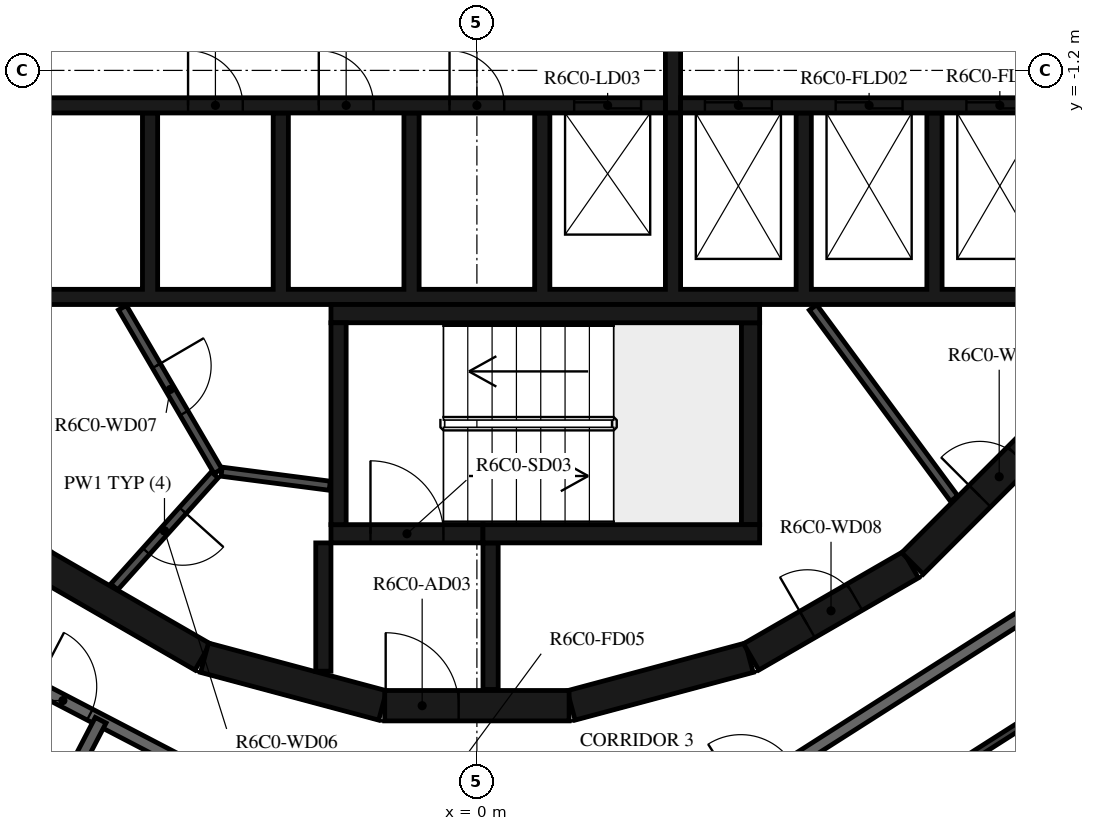
"""IFC4 building model, lengths in metres.
Left out: names, types, materials, properties, quantities, classifications, styles, units other than length and angle.
Written with IfcOpenShell. Run it as: python <this file> out.ifc"""

import sys

from ifc_helpers import new_model, si_unit, direction, frame, frame_2d, origin, place, context, subcontext, project, spatial, polyline, rectangle, outline, extrude, element, fill, save


model = new_model("IFC4")
c1 = context("Model", 3, precision=1e-05, world=origin(), true_north=direction((0.0, 1.0)))
c2 = subcontext(c1, "Body", "Model", "MODEL_VIEW")
j1 = project(units=[si_unit("LENGTHUNIT", "METRE"), si_unit("PLANEANGLEUNIT", "RADIAN")], contexts=[c1])
p1 = place(None, origin())
s1 = spatial("IfcSite", under=j1, at=p1, CompositionType="ELEMENT")
p2 = place(p1, origin())
s2 = spatial("IfcBuilding", under=s1, at=p2, CompositionType="ELEMENT")
p3 = place(p2, frame((0.0, 0.0, 254.7)))
s3 = spatial("IfcBuildingStorey", under=s2, at=p3, CompositionType="ELEMENT", Elevation=254.7)
p4 = place(p3, frame((1.55, -11.643, 0.0), z_axis=(0.0, 0.0, 1.0), x_axis=(0.965948410781, 0.258734743916, 0.0)))
e1 = element("IfcWall", 1, at=p4, inside=s3, PredefinedType="SHEAR", context=c2, shape_type="SweptSolid", body=[
    extrude(rectangle(XDim=3.033, YDim=0.5, at=frame_2d((1.516, 0.0))), origin(), (0.0, 0.0, 1.0), 3.05),
])
p5 = place(p3, frame((4.51, -10.845, 0.0), z_axis=(0.0, 0.0, 1.0), x_axis=(0.865975092491, 0.500087131594, 0.0)))
e2 = element("IfcWall", 2, at=p5, inside=s3, PredefinedType="SHEAR", context=c2, shape_type="SweptSolid", body=[
    extrude(rectangle(XDim=3.033, YDim=0.5, at=frame_2d((1.516, 0.0))), origin(), (0.0, 0.0, 1.0), 3.05),
])
p6 = place(p5, frame((1.066, 0.0, 0.0)))
e3 = element("IfcOpeningElement", 3, at=p6, cuts=e2, PredefinedType="OPENING", context=c2, shape_type="SweptSolid", body=[
    extrude(rectangle(XDim=0.9, YDim=2.1, at=frame_2d((0.45, 1.05))), frame((0.0, 0.26, 0.0), z_axis=(0.0, -1.0, 0.0), x_axis=(1.0, 0.0, 0.0)), (0.0, 0.0, 1.0), 0.52),
])
p7 = place(p3, frame((7.164, -9.308, 0.0), z_axis=(0.0, 0.0, 1.0), x_axis=(0.707106781187, 0.707106781187, 0.0)))
e4 = element("IfcWall", 4, at=p7, inside=s3, PredefinedType="SHEAR", context=c2, shape_type="SweptSolid", body=[
    extrude(rectangle(XDim=3.032, YDim=0.5, at=frame_2d((1.516, 0.0))), origin(), (0.0, 0.0, 1.0), 3.05),
])
p8 = place(p7, frame((1.566, 0.0, 0.0)))
e5 = element("IfcOpeningElement", 5, at=p8, cuts=e4, PredefinedType="OPENING", context=c2, shape_type="SweptSolid", body=[
    extrude(rectangle(XDim=0.9, YDim=2.1, at=frame_2d((0.45, 1.05))), frame((0.0, 0.26, 0.0), z_axis=(0.0, -1.0, 0.0), x_axis=(1.0, 0.0, 0.0)), (0.0, 0.0, 1.0), 0.52),
])
for number, where, z_axis, x_axis in (
    (6, (-7.137, -9.329, 0.0), (0.0, 0.0, 1.0), (0.866, -0.5, 0.0)),
    (7, (-4.479, -10.858, 0.0), (0.0, 0.0, 1.0), (0.966, -0.259, 0.0)),
):
    element("IfcWall", number, at=place(p3, frame(where, z_axis=z_axis, x_axis=x_axis)), inside=s3, PredefinedType="SHEAR", context=c2, shape_type="SweptSolid", body=[
        extrude(rectangle(XDim=3.033, YDim=0.5, at=frame_2d((1.516, 0.0))), origin(), (0.0, 0.0, 1.0), 3.05),
    ])
p9 = place(p3, frame((-1.516, -11.647, 0.0), z_axis=(0.0, 0.0, 1.0), x_axis=(1.0, 0.0, 0.0)))
e8 = element("IfcWall", 8, at=p9, inside=s3, PredefinedType="SHEAR", context=c2, shape_type="SweptSolid", body=[
    extrude(rectangle(XDim=3.033, YDim=0.5, at=frame_2d((1.516, 0.0))), origin(), (0.0, 0.0, 1.0), 3.05),
])
p10 = place(p9, frame((0.016, 0.0, 0.0)))
e9 = element("IfcOpeningElement", 9, at=p10, cuts=e8, PredefinedType="OPENING", context=c2, shape_type="SweptSolid", body=[
    extrude(rectangle(XDim=1.2, YDim=2.1, at=frame_2d((0.6, 1.05))), frame((0.0, 0.26, 0.0), z_axis=(0.0, -1.0, 0.0), x_axis=(1.0, 0.0, 0.0)), (0.0, 0.0, 1.0), 0.52),
])
p11 = place(p3, frame((-2.275, -8.67, 0.0), z_axis=(0.0, 0.0, 1.0), x_axis=(0.0, 1.0, 0.0)))
e10 = element("IfcWall", 10, at=p11, inside=s3, PredefinedType="SHEAR", context=c2, shape_type="SweptSolid", body=[
    extrude(rectangle(XDim=3.32, YDim=0.25, at=frame_2d((1.66, 0.0))), origin(), (0.0, 0.0, 1.0), 3.05),
])
p12 = place(p3, frame((-2.4, -5.2, 0.0), z_axis=(0.0, 0.0, 1.0), x_axis=(1.0, 0.0, 0.0)))
e11 = element("IfcWall", 11, at=p12, inside=s3, PredefinedType="SHEAR", context=c2, shape_type="SweptSolid", body=[
    extrude(rectangle(XDim=7.05, YDim=0.3, at=frame_2d((3.525, 0.0))), origin(), (0.0, 0.0, 1.0), 3.05),
])
p13 = place(p3, frame((4.5, -8.67, 0.0), z_axis=(0.0, 0.0, 1.0), x_axis=(0.0, 1.0, 0.0)))
e12 = element("IfcWall", 12, at=p13, inside=s3, PredefinedType="SHEAR", context=c2, shape_type="SweptSolid", body=[
    extrude(rectangle(XDim=3.32, YDim=0.3, at=frame_2d((1.66, 0.0))), origin(), (0.0, 0.0, 1.0), 3.05),
])
p14 = place(p3, frame((0.1, -8.82, 0.0), z_axis=(0.0, 0.0, 1.0), x_axis=(1.0, 0.0, 0.0)))
e13 = element("IfcWall", 13, at=p14, inside=s3, PredefinedType="SHEAR", context=c2, shape_type="SweptSolid", body=[
    extrude(rectangle(XDim=4.55, YDim=0.3, at=frame_2d((2.275, 0.0))), origin(), (0.0, 0.0, 1.0), 3.05),
])
p15 = place(p3, frame((-2.4, -8.82, 0.0), z_axis=(0.0, 0.0, 1.0), x_axis=(1.0, 0.0, 0.0)))
e14 = element("IfcWall", 14, at=p15, inside=s3, PredefinedType="SHEAR", context=c2, shape_type="SweptSolid", body=[
    extrude(rectangle(XDim=2.5, YDim=0.3, at=frame_2d((1.25, 0.0))), origin(), (0.0, 0.0, 1.0), 3.05),
])
p16 = place(p15, frame((0.65, 0.0, 0.0)))
e15 = element("IfcOpeningElement", 15, at=p16, cuts=e14, PredefinedType="OPENING", context=c2, shape_type="SweptSolid", body=[
    extrude(rectangle(XDim=1.2, YDim=2.1, at=frame_2d((0.6, 1.05))), frame((0.0, 0.16, 0.0), z_axis=(0.0, -1.0, 0.0), x_axis=(1.0, 0.0, 0.0)), (0.0, 0.0, 1.0), 0.32),
])
p17 = place(p3, frame((-2.525, -8.97, 0.0), z_axis=(0.0, 0.0, 1.0), x_axis=(0.0, -1.0, 0.0)))
e16 = element("IfcWall", 16, at=p17, inside=s3, PredefinedType="SHEAR", context=c2, shape_type="SweptSolid", body=[
    extrude(rectangle(XDim=2.11, YDim=0.25, at=frame_2d((1.055, 0.0))), origin(), (0.0, 0.0, 1.0), 3.05),
])
p18 = place(p3, frame((0.225, -8.97, 0.0), z_axis=(0.0, 0.0, 1.0), x_axis=(0.0, -1.0, 0.0)))
e17 = element("IfcWall", 17, at=p18, inside=s3, PredefinedType="SHEAR", context=c2, shape_type="SweptSolid", body=[
    extrude(rectangle(XDim=2.41, YDim=0.25, at=frame_2d((1.205, 0.0))), origin(), (0.0, 0.0, 1.0), 3.05),
])
p19 = place(p3, origin())
e18 = element("IfcWall", 18, at=p19, inside=s3, PredefinedType="SHEAR", context=c2, shape_type="SweptSolid", body=[
    extrude(outline(polyline([(9.8, -5.05), (9.8, -4.8), (9.8, -1.9), (9.55, -1.9), (9.55, -4.8), (7.65, -4.8), (7.65, -1.9), (7.4, -1.9), (7.4, -4.8), (5.5, -4.8), (5.5, -1.9), (5.25, -1.9), (5.25, -4.8), (3.35, -4.8), (3.35, -1.9), (3.1, -1.9), (3.1, -4.8), (1.2, -4.8), (1.2, -1.9), (0.95, -1.9), (0.95, -4.8), (-0.95, -4.8), (-0.95, -1.9), (-1.2, -1.9), (-1.2, -4.8), (-3.1, -4.8), (-3.1, -1.9), (-3.35, -1.9), (-3.35, -4.8), (-5.25, -4.8), (-5.25, -1.9), (-5.5, -1.9), (-5.5, -4.8), (-7.4, -4.8), (-7.4, -1.9), (-7.65, -1.9), (-7.65, -4.8), (-9.55, -4.8), (-9.55, -1.9), (-9.8, -1.9), (-9.8, -4.8), (-9.8, -5.05), (9.8, -5.05)])), origin(), (0.0, 0.0, 1.0), 3.05),
])
p20 = place(p3, frame((-11.28, -1.775, 0.0), z_axis=(0.0, 0.0, 1.0), x_axis=(1.0, 0.0, 0.0)))
e19 = element("IfcWall", 19, at=p20, inside=s3, PredefinedType="SHEAR", context=c2, shape_type="SweptSolid", body=[
    extrude(rectangle(XDim=14.38, YDim=0.25, at=frame_2d((7.19, 0.0))), origin(), (0.0, 0.0, 1.0), 3.05),
])
p21 = place(p20, frame((12.88, 0.0, 0.0)))
e20 = element("IfcOpeningElement", 20, at=p21, cuts=e19, PredefinedType="OPENING", context=c2, shape_type="SweptSolid", body=[
    extrude(rectangle(XDim=1.1, YDim=2.1, at=frame_2d((0.55, 1.05))), frame((0.0, 0.135, 0.0), z_axis=(0.0, -1.0, 0.0), x_axis=(1.0, 0.0, 0.0)), (0.0, 0.0, 1.0), 0.27),
])
p22 = place(p20, frame((6.53, 0.0, 0.0)))
e21 = element("IfcOpeningElement", 21, at=p22, cuts=e19, PredefinedType="OPENING", context=c2, shape_type="SweptSolid", body=[
    extrude(rectangle(XDim=0.9, YDim=2.1, at=frame_2d((0.45, 1.05))), frame((0.0, 0.135, 0.0), z_axis=(0.0, -1.0, 0.0), x_axis=(1.0, 0.0, 0.0)), (0.0, 0.0, 1.0), 0.27),
])
p23 = place(p20, frame((8.68, 0.0, 0.0)))
e22 = element("IfcOpeningElement", 22, at=p23, cuts=e19, PredefinedType="OPENING", context=c2, shape_type="SweptSolid", body=[
    extrude(rectangle(XDim=0.9, YDim=2.1, at=frame_2d((0.45, 1.05))), frame((0.0, 0.135, 0.0), z_axis=(0.0, -1.0, 0.0), x_axis=(1.0, 0.0, 0.0)), (0.0, 0.0, 1.0), 0.27),
])
p24 = place(p20, frame((10.83, 0.0, 0.0)))
e23 = element("IfcOpeningElement", 23, at=p24, cuts=e19, PredefinedType="OPENING", context=c2, shape_type="SweptSolid", body=[
    extrude(rectangle(XDim=0.9, YDim=2.1, at=frame_2d((0.45, 1.05))), frame((0.0, 0.135, 0.0), z_axis=(0.0, -1.0, 0.0), x_axis=(1.0, 0.0, 0.0)), (0.0, 0.0, 1.0), 0.27),
])
p25 = place(p3, frame((3.35, -1.775, 0.0), z_axis=(0.0, 0.0, 1.0), x_axis=(1.0, 0.0, 0.0)))
e24 = element("IfcWall", 24, at=p25, inside=s3, PredefinedType="SHEAR", context=c2, shape_type="SweptSolid", body=[
    extrude(rectangle(XDim=7.93, YDim=0.25, at=frame_2d((3.965, 0.0))), origin(), (0.0, 0.0, 1.0), 3.05),
])
p26 = place(p25, frame((0.4, 0.0, 0.0)))
e25 = element("IfcOpeningElement", 25, at=p26, cuts=e24, PredefinedType="OPENING", context=c2, shape_type="SweptSolid", body=[
    extrude(rectangle(XDim=1.1, YDim=2.4, at=frame_2d((0.55, 1.2))), frame((0.0, 0.135, 0.0), z_axis=(0.0, -1.0, 0.0), x_axis=(1.0, 0.0, 0.0)), (0.0, 0.0, 1.0), 0.27),
])
p27 = place(p25, frame((2.55, 0.0, 0.0)))
e26 = element("IfcOpeningElement", 26, at=p27, cuts=e24, PredefinedType="OPENING", context=c2, shape_type="SweptSolid", body=[
    extrude(rectangle(XDim=1.1, YDim=2.4, at=frame_2d((0.55, 1.2))), frame((0.0, 0.135, 0.0), z_axis=(0.0, -1.0, 0.0), x_axis=(1.0, 0.0, 0.0)), (0.0, 0.0, 1.0), 0.27),
])
p28 = place(p25, frame((4.7, 0.0, 0.0)))
e27 = element("IfcOpeningElement", 27, at=p28, cuts=e24, PredefinedType="OPENING", context=c2, shape_type="SweptSolid", body=[
    extrude(rectangle(XDim=1.1, YDim=2.4, at=frame_2d((0.55, 1.2))), frame((0.0, 0.135, 0.0), z_axis=(0.0, -1.0, 0.0), x_axis=(1.0, 0.0, 0.0)), (0.0, 0.0, 1.0), 0.27),
])
p29 = place(p3, frame((3.225, -1.9, 0.0), z_axis=(0.0, 0.0, 1.0), x_axis=(0.0, 1.0, 0.0)))
e28 = element("IfcWall", 28, at=p29, inside=s3, PredefinedType="SHEAR", context=c2, shape_type="SweptSolid", body=[
    extrude(rectangle(XDim=3.8, YDim=0.25, at=frame_2d((1.9, 0.0))), origin(), (0.0, 0.0, 1.0), 3.05),
])
p30 = place(p3, frame((5.528, -5.098, 0.0), z_axis=(0.0, 0.0, 1.0), x_axis=(0.594034318069, -0.804439698769, 0.0)))
e29 = element("IfcWall", 29, at=p30, inside=s3, PredefinedType="PARTITIONING", context=c2, shape_type="SweptSolid", body=[
    extrude(rectangle(XDim=3.907, YDim=0.15, at=frame_2d((1.953, 0.0))), origin(), (0.0, 0.0, 1.0), 3.05),
])
p31 = place(p3, frame((-5.829, -5.102, 0.0), z_axis=(0.0, 0.0, 1.0), x_axis=(0.504480008384, -0.863423373057, 0.0)))
e30 = element("IfcWall", 30, at=p31, inside=s3, PredefinedType="PARTITIONING", context=c2, shape_type="SweptSolid", body=[
    extrude(rectangle(XDim=3.115, YDim=0.15, at=frame_2d((1.558, 0.0))), origin(), (0.0, 0.0, 1.0), 3.05),
])
p32 = place(p31, frame((1.107, 0.0, 0.0)))
e31 = element("IfcOpeningElement", 31, at=p32, cuts=e30, PredefinedType="OPENING", context=c2, shape_type="SweptSolid", body=[
    extrude(rectangle(XDim=0.9, YDim=2.1, at=frame_2d((0.45, 1.05))), frame((0.0, 0.085, 0.0), z_axis=(0.0, -1.0, 0.0), x_axis=(1.0, 0.0, 0.0)), (0.0, 0.0, 1.0), 0.17),
])
p33 = place(p3, frame((-4.311, -7.851, 0.0), z_axis=(0.0, 0.0, 1.0), x_axis=(-0.667869133096, -0.744278725383, 0.0)))
e32 = element("IfcWall", 32, at=p33, inside=s3, PredefinedType="PARTITIONING", context=c2, shape_type="SweptSolid", body=[
    extrude(rectangle(XDim=2.476, YDim=0.15, at=frame_2d((1.238, 0.0))), origin(), (0.0, 0.0, 1.0), 3.05),
])
p34 = place(p33, frame((0.788, 0.0, 0.0)))
e33 = element("IfcOpeningElement", 33, at=p34, cuts=e32, PredefinedType="OPENING", context=c2, shape_type="SweptSolid", body=[
    extrude(rectangle(XDim=0.9, YDim=2.1, at=frame_2d((0.45, 1.05))), frame((0.0, 0.085, 0.0), z_axis=(0.0, -1.0, 0.0), x_axis=(1.0, 0.0, 0.0)), (0.0, 0.0, 1.0), 0.17),
])
p35 = place(p3, frame((-4.198, -7.799, 0.0), z_axis=(0.0, 0.0, 1.0), x_axis=(0.991686747293, -0.128675542523, 0.0)))
e34 = element("IfcWall", 34, at=p35, inside=s3, PredefinedType="PARTITIONING", context=c2, shape_type="SweptSolid", body=[
    extrude(rectangle(XDim=1.793, YDim=0.15, at=frame_2d((0.896, 0.0))), origin(), (0.0, 0.0, 1.0), 3.05),
])
p36 = place(p3, frame((-9.372, -10.228, 0.0), z_axis=(0.0, 0.0, 1.0), x_axis=(0.887005184532, -0.461759464021, 0.0)))
e35 = element("IfcWall", 35, at=p36, inside=s3, PredefinedType="STANDARD", context=c2, shape_type="SweptSolid", body=[
    extrude(rectangle(XDim=7.181, YDim=0.2, at=frame_2d((3.591, 0.0))), origin(), (0.0, 0.0, 1.0), 3.05),
])
p37 = place(p36, frame((2.391, 0.0, 0.0)))
e36 = element("IfcOpeningElement", 36, at=p37, cuts=e35, PredefinedType="OPENING", context=c2, shape_type="SweptSolid", body=[
    extrude(rectangle(XDim=1.0, YDim=2.1, at=frame_2d((0.5, 1.05))), frame((0.0, 0.11, 0.0), z_axis=(0.0, -1.0, 0.0), x_axis=(1.0, 0.0, 0.0)), (0.0, 0.0, 1.0), 0.22),
])
p38 = place(p3, frame((4.172, -13.231, 0.0), z_axis=(0.0, 0.0, 1.0), x_axis=(0.843388394728, 0.537304397561, 0.0)))
e37 = element("IfcWall", 37, at=p38, inside=s3, PredefinedType="STANDARD", context=c2, shape_type="SweptSolid", body=[
    extrude(rectangle(XDim=7.181, YDim=0.2, at=frame_2d((3.59, 0.0))), origin(), (0.0, 0.0, 1.0), 3.05),
])
p39 = place(p38, frame((0.2, 0.0, 0.0)))
e38 = element("IfcOpeningElement", 38, at=p39, cuts=e37, PredefinedType="OPENING", context=c2, shape_type="SweptSolid", body=[
    extrude(rectangle(XDim=1.0, YDim=2.1, at=frame_2d((0.5, 1.05))), frame((0.0, 0.11, 0.0), z_axis=(0.0, -1.0, 0.0), x_axis=(1.0, 0.0, 0.0)), (0.0, 0.0, 1.0), 0.22),
])
p40 = place(p3, frame((-7.541, -14.486, 0.0), z_axis=(0.0, 0.0, 1.0), x_axis=(0.461746051786, 0.88701216658, 0.0)))
e39 = element("IfcWall", 39, at=p40, inside=s3, PredefinedType="STANDARD", context=c2, shape_type="SweptSolid", body=[
    extrude(rectangle(XDim=2.931, YDim=0.2, at=frame_2d((1.466, 0.0))), origin(), (0.0, 0.0, 1.0), 3.05),
])
p41 = place(p3, frame((-10.421, -11.373, 0.0), z_axis=(0.0, 0.0, 1.0), x_axis=(0.887012970857, -0.461744506769, 0.0)))
e40 = element("IfcWall", 40, at=p41, inside=s3, PredefinedType="PARTITIONING", context=c2, shape_type="SweptSolid", body=[
    extrude(rectangle(XDim=7.985, YDim=0.12, at=frame_2d((3.992, 0.0))), origin(), (0.0, 0.0, 1.0), 3.05),
])
p42 = place(p41, frame((4.192, 0.0, 0.0)))
e41 = element("IfcOpeningElement", 41, at=p42, cuts=e40, PredefinedType="OPENING", context=c2, shape_type="SweptSolid", body=[
    extrude(rectangle(XDim=0.9, YDim=2.1, at=frame_2d((0.45, 1.05))), frame((0.0, 0.07, 0.0), z_axis=(0.0, -1.0, 0.0), x_axis=(1.0, 0.0, 0.0)), (0.0, 0.0, 1.0), 0.14),
])
p43 = place(p3, frame((4.83, -14.59, 0.0), z_axis=(0.0, 0.0, 1.0), x_axis=(0.843393042763, 0.537297101629, 0.0)))
e42 = element("IfcWall", 42, at=p43, inside=s3, PredefinedType="PARTITIONING", context=c2, shape_type="SweptSolid", body=[
    extrude(rectangle(XDim=7.53, YDim=0.12, at=frame_2d((3.765, 0.0))), origin(), (0.0, 0.0, 1.0), 3.05),
])
p44 = place(p43, frame((0.2, 0.0, 0.0)))
e43 = element("IfcOpeningElement", 43, at=p44, cuts=e42, PredefinedType="OPENING", context=c2, shape_type="SweptSolid", body=[
    extrude(rectangle(XDim=0.9, YDim=2.1, at=frame_2d((0.45, 1.05))), frame((0.0, 0.07, 0.0), z_axis=(0.0, -1.0, 0.0), x_axis=(1.0, 0.0, 0.0)), (0.0, 0.0, 1.0), 0.14),
])
p45 = place(p16, origin())
e44 = element("IfcDoor", 44, at=p45, inside=s3, OperationType="SINGLE_SWING_LEFT", PredefinedType="DOOR", context=c2, shape_type="SweptSolid", body=[
    extrude(rectangle(XDim=1.2, YDim=2.1, at=frame_2d((0.6, 1.05))), frame((0.0, 0.025, 0.0), z_axis=(0.0, -1.0, 0.0), x_axis=(1.0, 0.0, 0.0)), (0.0, 0.0, 1.0), 0.05),
])
fill(e15, e44)
p46 = place(p10, origin())
e45 = element("IfcDoor", 45, at=p46, inside=s3, OperationType="SINGLE_SWING_RIGHT", PredefinedType="DOOR", context=c2, shape_type="SweptSolid", body=[
    extrude(rectangle(XDim=1.2, YDim=2.1, at=frame_2d((0.6, 1.05))), frame((0.0, 0.025, 0.0), z_axis=(0.0, -1.0, 0.0), x_axis=(1.0, 0.0, 0.0)), (0.0, 0.0, 1.0), 0.05),
])
fill(e9, e45)
p47 = place(p21, origin())
e46 = element("IfcDoor", 46, at=p47, inside=s3, OperationType="DOUBLE_DOOR_SLIDING", PredefinedType="DOOR", context=c2, shape_type="SweptSolid", body=[
    extrude(rectangle(XDim=1.1, YDim=2.1, at=frame_2d((0.55, 1.05))), frame((0.0, 0.025, 0.0), z_axis=(0.0, -1.0, 0.0), x_axis=(1.0, 0.0, 0.0)), (0.0, 0.0, 1.0), 0.05),
])
fill(e20, e46)
p48 = place(p26, origin())
e47 = element("IfcDoor", 47, at=p48, inside=s3, OperationType="DOUBLE_DOOR_SLIDING", PredefinedType="DOOR", context=c2, shape_type="SweptSolid", body=[
    extrude(rectangle(XDim=1.1, YDim=2.4, at=frame_2d((0.55, 1.2))), frame((0.0, 0.025, 0.0), z_axis=(0.0, -1.0, 0.0), x_axis=(1.0, 0.0, 0.0)), (0.0, 0.0, 1.0), 0.05),
])
fill(e25, e47)
p49 = place(p27, origin())
e48 = element("IfcDoor", 48, at=p49, inside=s3, OperationType="DOUBLE_DOOR_SLIDING", PredefinedType="DOOR", context=c2, shape_type="SweptSolid", body=[
    extrude(rectangle(XDim=1.1, YDim=2.4, at=frame_2d((0.55, 1.2))), frame((0.0, 0.025, 0.0), z_axis=(0.0, -1.0, 0.0), x_axis=(1.0, 0.0, 0.0)), (0.0, 0.0, 1.0), 0.05),
])
fill(e26, e48)
p50 = place(p28, origin())
e49 = element("IfcDoor", 49, at=p50, inside=s3, OperationType="DOUBLE_DOOR_SLIDING", PredefinedType="DOOR", context=c2, shape_type="SweptSolid", body=[
    extrude(rectangle(XDim=1.1, YDim=2.4, at=frame_2d((0.55, 1.2))), frame((0.0, 0.025, 0.0), z_axis=(0.0, -1.0, 0.0), x_axis=(1.0, 0.0, 0.0)), (0.0, 0.0, 1.0), 0.05),
])
fill(e27, e49)
p51 = place(p22, origin())
e50 = element("IfcDoor", 50, at=p51, inside=s3, OperationType="SINGLE_SWING_LEFT", PredefinedType="DOOR", context=c2, shape_type="SweptSolid", body=[
    extrude(rectangle(XDim=0.9, YDim=2.1, at=frame_2d((0.45, 1.05))), frame((0.0, 0.025, 0.0), z_axis=(0.0, -1.0, 0.0), x_axis=(1.0, 0.0, 0.0)), (0.0, 0.0, 1.0), 0.05),
])
fill(e21, e50)
p52 = place(p23, origin())
e51 = element("IfcDoor", 51, at=p52, inside=s3, OperationType="SINGLE_SWING_RIGHT", PredefinedType="DOOR", context=c2, shape_type="SweptSolid", body=[
    extrude(rectangle(XDim=0.9, YDim=2.1, at=frame_2d((0.45, 1.05))), frame((0.0, 0.025, 0.0), z_axis=(0.0, -1.0, 0.0), x_axis=(1.0, 0.0, 0.0)), (0.0, 0.0, 1.0), 0.05),
])
fill(e22, e51)
p53 = place(p24, origin())
e52 = element("IfcDoor", 52, at=p53, inside=s3, OperationType="SINGLE_SWING_LEFT", PredefinedType="DOOR", context=c2, shape_type="SweptSolid", body=[
    extrude(rectangle(XDim=0.9, YDim=2.1, at=frame_2d((0.45, 1.05))), frame((0.0, 0.025, 0.0), z_axis=(0.0, -1.0, 0.0), x_axis=(1.0, 0.0, 0.0)), (0.0, 0.0, 1.0), 0.05),
])
fill(e23, e52)
p54 = place(p34, origin())
e53 = element("IfcDoor", 53, at=p54, inside=s3, OperationType="SINGLE_SWING_RIGHT", PredefinedType="DOOR", context=c2, shape_type="SweptSolid", body=[
    extrude(rectangle(XDim=0.9, YDim=2.1, at=frame_2d((0.45, 1.05))), frame((0.0, 0.025, 0.0), z_axis=(0.0, -1.0, 0.0), x_axis=(1.0, 0.0, 0.0)), (0.0, 0.0, 1.0), 0.05),
])
fill(e33, e53)
p55 = place(p32, origin())
e54 = element("IfcDoor", 54, at=p55, inside=s3, OperationType="SINGLE_SWING_LEFT", PredefinedType="DOOR", context=c2, shape_type="SweptSolid", body=[
    extrude(rectangle(XDim=0.9, YDim=2.1, at=frame_2d((0.45, 1.05))), frame((0.0, 0.025, 0.0), z_axis=(0.0, -1.0, 0.0), x_axis=(1.0, 0.0, 0.0)), (0.0, 0.0, 1.0), 0.05),
])
fill(e31, e54)
p56 = place(p6, origin())
e55 = element("IfcDoor", 55, at=p56, inside=s3, OperationType="SINGLE_SWING_RIGHT", PredefinedType="DOOR", context=c2, shape_type="SweptSolid", body=[
    extrude(rectangle(XDim=0.9, YDim=2.1, at=frame_2d((0.45, 1.05))), frame((0.0, 0.025, 0.0), z_axis=(0.0, -1.0, 0.0), x_axis=(1.0, 0.0, 0.0)), (0.0, 0.0, 1.0), 0.05),
])
fill(e3, e55)
p57 = place(p8, origin())
e56 = element("IfcDoor", 56, at=p57, inside=s3, OperationType="SINGLE_SWING_LEFT", PredefinedType="DOOR", context=c2, shape_type="SweptSolid", body=[
    extrude(rectangle(XDim=0.9, YDim=2.1, at=frame_2d((0.45, 1.05))), frame((0.0, 0.025, 0.0), z_axis=(0.0, -1.0, 0.0), x_axis=(1.0, 0.0, 0.0)), (0.0, 0.0, 1.0), 0.05),
])
fill(e5, e56)
p58 = place(p37, origin())
e57 = element("IfcDoor", 57, at=p58, inside=s3, OperationType="SINGLE_SWING_RIGHT", PredefinedType="DOOR", context=c2, shape_type="SweptSolid", body=[
    extrude(rectangle(XDim=1.0, YDim=2.1, at=frame_2d((0.5, 1.05))), frame((0.0, 0.025, 0.0), z_axis=(0.0, -1.0, 0.0), x_axis=(1.0, 0.0, 0.0)), (0.0, 0.0, 1.0), 0.05),
])
fill(e36, e57)
save(model, sys.argv[1])
